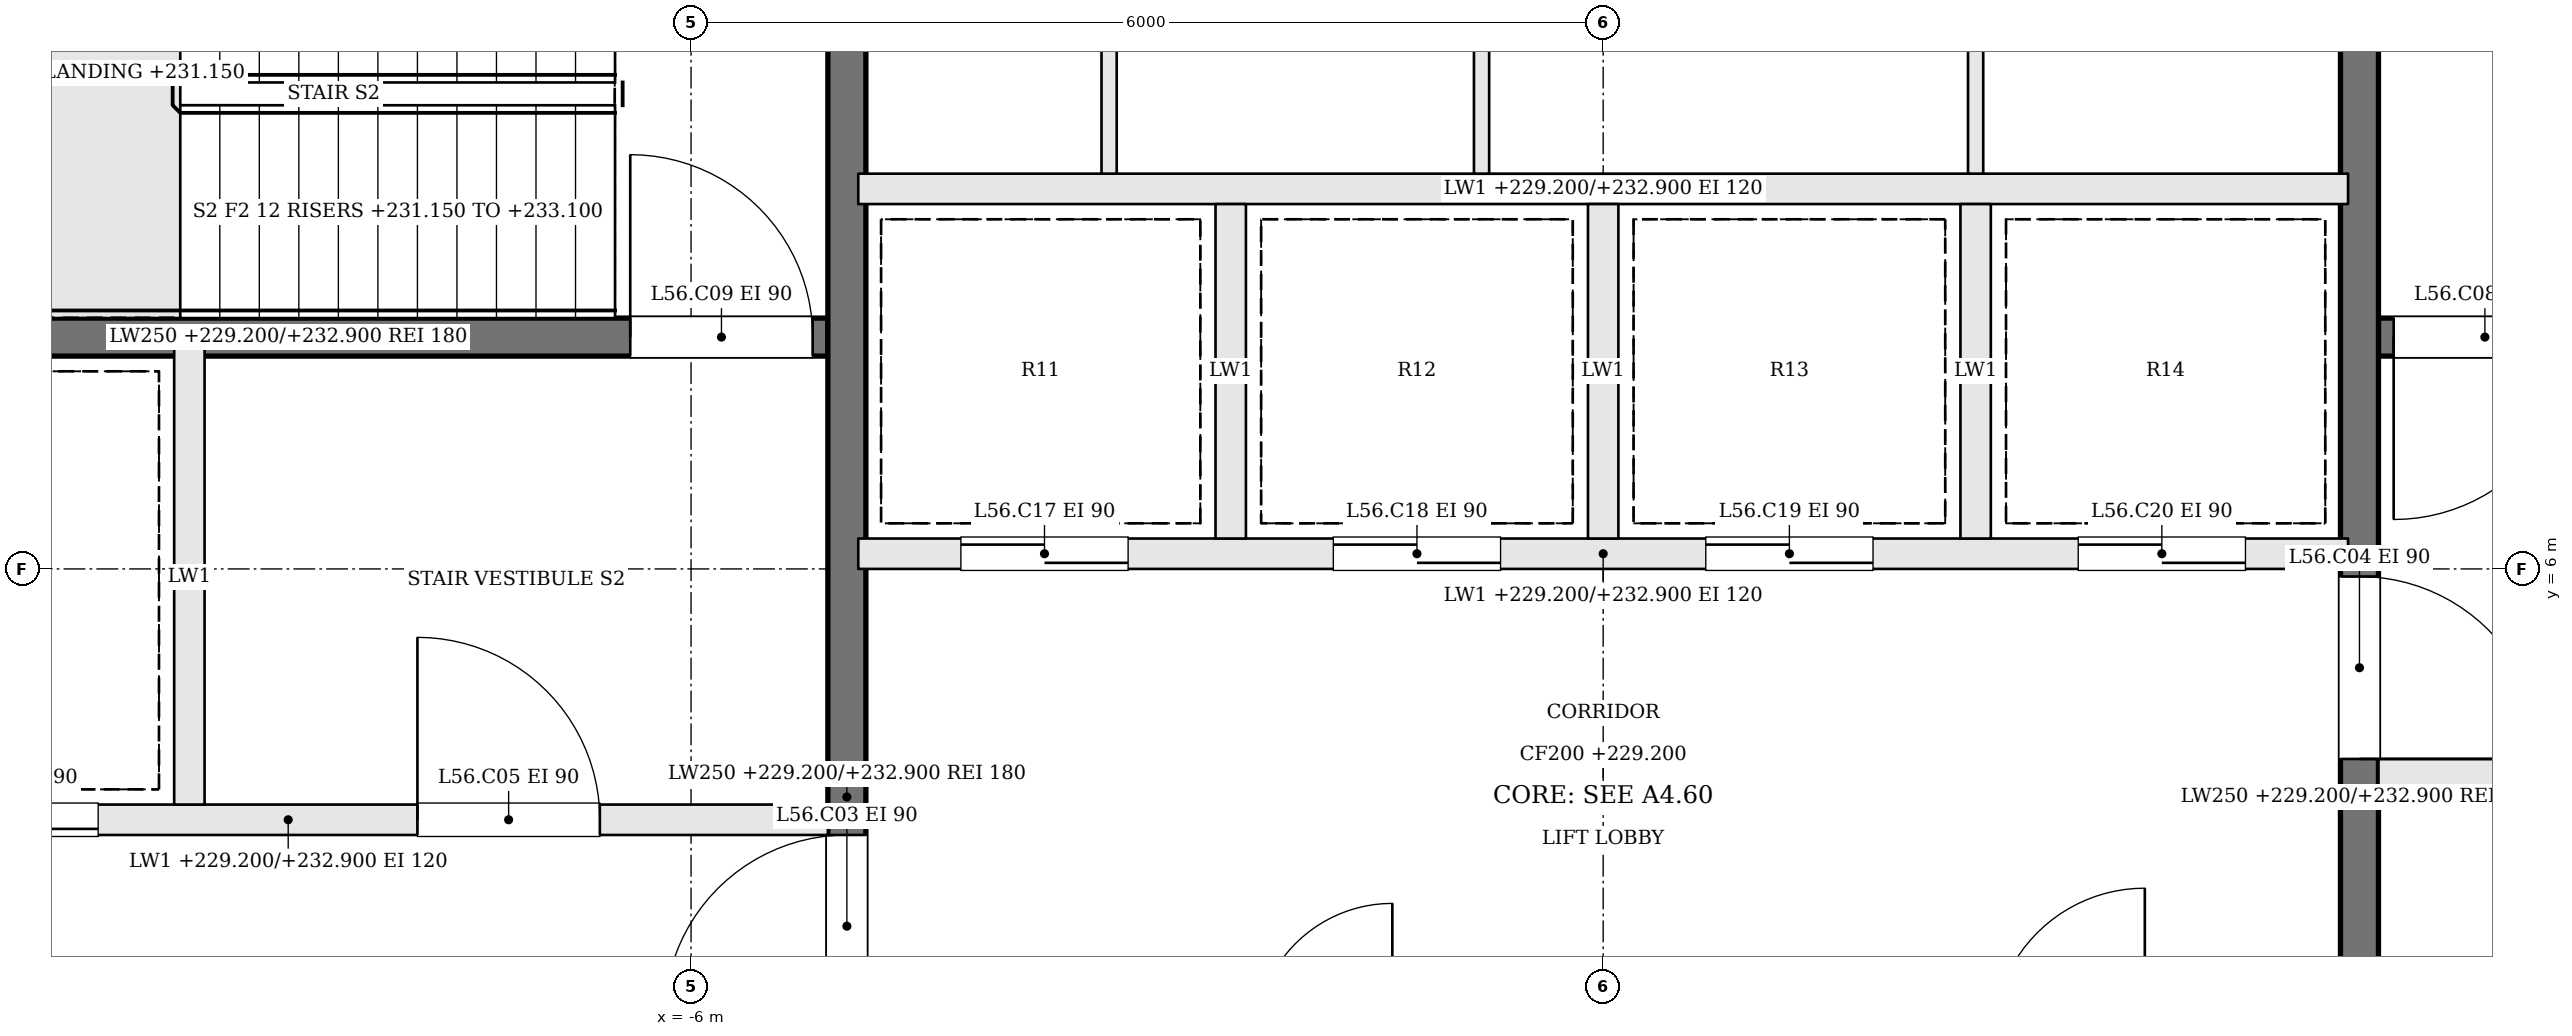
"""IFC4 building model, lengths in metres.
Left out: names, types, materials, properties, quantities, classifications, styles, units other than length and angle.
Written with IfcOpenShell. Run it as: python <this file> out.ifc"""

import sys

from ifc_helpers import new_model, si_unit, direction, frame, frame_2d, origin, place, context, subcontext, project, spatial, rectangle, extrude, element, fill, save


model = new_model("IFC4")
c1 = context("Model", 3, precision=1e-05, world=origin(), true_north=direction((0.0, 1.0)))
c2 = subcontext(c1, "Body", "Model", "MODEL_VIEW")
j1 = project(units=[si_unit("LENGTHUNIT", "METRE"), si_unit("PLANEANGLEUNIT", "RADIAN")], contexts=[c1])
p1 = place(None, origin())
s1 = spatial("IfcSite", under=j1, at=p1, CompositionType="ELEMENT")
p2 = place(p1, origin())
s2 = spatial("IfcBuilding", under=s1, at=p2, CompositionType="ELEMENT")
p3 = place(p2, frame((0.0, 0.0, 229.2)))
s3 = spatial("IfcBuildingStorey", under=s2, at=p3, CompositionType="ELEMENT", Elevation=229.2)
p4 = place(p3, frame((12.2, 7.525, 0.0), z_axis=(0.0, 0.0, 1.0), x_axis=(-1.0, 0.0, 0.0)))
e1 = element("IfcWall", 1, at=p4, inside=s3, PredefinedType="SOLIDWALL", context=c2, shape_type="SweptSolid", body=[
    extrude(rectangle(XDim=7.1, YDim=0.25, at=frame_2d((3.55, 0.0))), origin(), (0.0, 0.0, 1.0), 3.7),
])
p5 = place(p4, frame((5.8, 0.0, 0.0)))
e2 = element("IfcOpeningElement", 2, at=p5, cuts=e1, PredefinedType="OPENING", context=c2, shape_type="SweptSolid", body=[
    extrude(rectangle(XDim=1.2, YDim=2.1, at=frame_2d((0.6, 1.05))), frame((0.0, 0.135, 0.0), z_axis=(0.0, -1.0, 0.0), x_axis=(1.0, 0.0, 0.0)), (0.0, 0.0, 1.0), 0.27),
])
p6 = place(p3, frame((-12.2, 4.35, 0.0), z_axis=(0.0, 0.0, 1.0), x_axis=(1.0, 0.0, 0.0)))
e3 = element("IfcWall", 3, at=p6, inside=s3, PredefinedType="SOLIDWALL", context=c2, shape_type="SweptSolid", body=[
    extrude(rectangle(XDim=7.1, YDim=0.2, at=frame_2d((3.55, 0.0))), origin(), (0.0, 0.0, 1.0), 3.7),
])
p7 = place(p6, frame((4.4, 0.0, 0.0)))
e4 = element("IfcOpeningElement", 4, at=p7, cuts=e3, PredefinedType="OPENING", context=c2, shape_type="SweptSolid", body=[
    extrude(rectangle(XDim=1.2, YDim=2.1, at=frame_2d((0.6, 1.05))), frame((0.0, 0.11, 0.0), z_axis=(0.0, -1.0, 0.0), x_axis=(1.0, 0.0, 0.0)), (0.0, 0.0, 1.0), 0.22),
])
p8 = place(p6, frame((1.1, 0.0, 0.0)))
e5 = element("IfcOpeningElement", 5, at=p8, cuts=e3, PredefinedType="OPENING", context=c2, shape_type="SweptSolid", body=[
    extrude(rectangle(XDim=1.2, YDim=2.1, at=frame_2d((0.6, 1.05))), frame((0.0, 0.11, 0.0), z_axis=(0.0, -1.0, 0.0), x_axis=(1.0, 0.0, 0.0)), (0.0, 0.0, 1.0), 0.22),
])
p9 = place(p3, frame((12.2, 4.65, 0.0), z_axis=(0.0, 0.0, 1.0), x_axis=(-1.0, 0.0, 0.0)))
e6 = element("IfcWall", 6, at=p9, inside=s3, PredefinedType="SOLIDWALL", context=c2, shape_type="SweptSolid", body=[
    extrude(rectangle(XDim=7.1, YDim=0.2, at=frame_2d((3.55, 0.0))), origin(), (0.0, 0.0, 1.0), 3.7),
])
p10 = place(p9, frame((4.4, 0.0, 0.0)))
e7 = element("IfcOpeningElement", 7, at=p10, cuts=e6, PredefinedType="OPENING", context=c2, shape_type="SweptSolid", body=[
    extrude(rectangle(XDim=1.2, YDim=2.1, at=frame_2d((0.6, 1.05))), frame((0.0, 0.11, 0.0), z_axis=(0.0, -1.0, 0.0), x_axis=(1.0, 0.0, 0.0)), (0.0, 0.0, 1.0), 0.22),
])
p11 = place(p9, frame((1.1, 0.0, 0.0)))
e8 = element("IfcOpeningElement", 8, at=p11, cuts=e6, PredefinedType="OPENING", context=c2, shape_type="SweptSolid", body=[
    extrude(rectangle(XDim=1.2, YDim=2.1, at=frame_2d((0.6, 1.05))), frame((0.0, 0.11, 0.0), z_axis=(0.0, -1.0, 0.0), x_axis=(1.0, 0.0, 0.0)), (0.0, 0.0, 1.0), 0.22),
])
p12 = place(p3, frame((-12.2, 7.525, 0.0), z_axis=(0.0, 0.0, 1.0), x_axis=(1.0, 0.0, 0.0)))
e9 = element("IfcWall", 9, at=p12, inside=s3, PredefinedType="SOLIDWALL", context=c2, shape_type="SweptSolid", body=[
    extrude(rectangle(XDim=7.1, YDim=0.25, at=frame_2d((3.55, 0.0))), origin(), (0.0, 0.0, 1.0), 3.7),
])
p13 = place(p12, frame((5.8, 0.0, 0.0)))
e10 = element("IfcOpeningElement", 10, at=p13, cuts=e9, PredefinedType="OPENING", context=c2, shape_type="SweptSolid", body=[
    extrude(rectangle(XDim=1.2, YDim=2.1, at=frame_2d((0.6, 1.05))), frame((0.0, 0.135, 0.0), z_axis=(0.0, -1.0, 0.0), x_axis=(1.0, 0.0, 0.0)), (0.0, 0.0, 1.0), 0.27),
])
p14 = place(p3, frame((-9.3, 4.45, 0.0), z_axis=(0.0, 0.0, 1.0), x_axis=(0.0, 1.0, 0.0)))
e11 = element("IfcWall", 11, at=p14, inside=s3, PredefinedType="SOLIDWALL", context=c2, shape_type="SweptSolid", body=[
    extrude(rectangle(XDim=3.0, YDim=0.2, at=frame_2d((1.5, 0.0))), origin(), (0.0, 0.0, 1.0), 3.7),
])
p15 = place(p3, frame((-4.975, -2.2, 0.0), z_axis=(0.0, 0.0, 1.0), x_axis=(0.0, 1.0, 0.0)))
e12 = element("IfcWall", 12, at=p15, inside=s3, PredefinedType="SOLIDWALL", context=c2, shape_type="SweptSolid", body=[
    extrude(rectangle(XDim=13.4, YDim=0.25, at=frame_2d((6.7, 0.0))), origin(), (0.0, 0.0, 1.0), 3.7),
])
p16 = place(p15, frame((5.25, 0.0, 0.0)))
e13 = element("IfcOpeningElement", 13, at=p16, cuts=e12, PredefinedType="OPENING", context=c2, shape_type="SweptSolid", body=[
    extrude(rectangle(XDim=1.2, YDim=2.1, at=frame_2d((0.6, 1.05))), frame((0.0, 0.135, 0.0), z_axis=(0.0, -1.0, 0.0), x_axis=(1.0, 0.0, 0.0)), (0.0, 0.0, 1.0), 0.27),
])
p17 = place(p3, frame((4.975, 11.2, 0.0), z_axis=(0.0, 0.0, 1.0), x_axis=(0.0, -1.0, 0.0)))
e14 = element("IfcWall", 14, at=p17, inside=s3, PredefinedType="SOLIDWALL", context=c2, shape_type="SweptSolid", body=[
    extrude(rectangle(XDim=13.4, YDim=0.25, at=frame_2d((6.7, 0.0))), origin(), (0.0, 0.0, 1.0), 3.7),
])
p18 = place(p17, frame((5.25, 0.0, 0.0)))
e15 = element("IfcOpeningElement", 15, at=p18, cuts=e14, PredefinedType="OPENING", context=c2, shape_type="SweptSolid", body=[
    extrude(rectangle(XDim=1.2, YDim=2.1, at=frame_2d((0.6, 1.05))), frame((0.0, 0.135, 0.0), z_axis=(0.0, -1.0, 0.0), x_axis=(1.0, 0.0, 0.0)), (0.0, 0.0, 1.0), 0.27),
])
p19 = place(p3, frame((-4.9, 6.1, 0.0), z_axis=(0.0, 0.0, 1.0), x_axis=(1.0, 0.0, 0.0)))
e16 = element("IfcWall", 16, at=p19, inside=s3, PredefinedType="SOLIDWALL", context=c2, shape_type="SweptSolid", body=[
    extrude(rectangle(XDim=9.8, YDim=0.2, at=frame_2d((4.9, 0.0))), origin(), (0.0, 0.0, 1.0), 3.7),
])
p20 = place(p19, frame((0.675, 0.0, 0.0)))
e17 = element("IfcOpeningElement", 17, at=p20, cuts=e16, PredefinedType="OPENING", context=c2, shape_type="SweptSolid", body=[
    extrude(rectangle(XDim=1.1, YDim=2.1, at=frame_2d((0.55, 1.05))), frame((0.0, 0.11, 0.0), z_axis=(0.0, -1.0, 0.0), x_axis=(1.0, 0.0, 0.0)), (0.0, 0.0, 1.0), 0.22),
])
p21 = place(p19, frame((3.125, 0.0, 0.0)))
e18 = element("IfcOpeningElement", 18, at=p21, cuts=e16, PredefinedType="OPENING", context=c2, shape_type="SweptSolid", body=[
    extrude(rectangle(XDim=1.1, YDim=2.1, at=frame_2d((0.55, 1.05))), frame((0.0, 0.11, 0.0), z_axis=(0.0, -1.0, 0.0), x_axis=(1.0, 0.0, 0.0)), (0.0, 0.0, 1.0), 0.22),
])
p22 = place(p19, frame((5.575, 0.0, 0.0)))
e19 = element("IfcOpeningElement", 19, at=p22, cuts=e16, PredefinedType="OPENING", context=c2, shape_type="SweptSolid", body=[
    extrude(rectangle(XDim=1.1, YDim=2.1, at=frame_2d((0.55, 1.05))), frame((0.0, 0.11, 0.0), z_axis=(0.0, -1.0, 0.0), x_axis=(1.0, 0.0, 0.0)), (0.0, 0.0, 1.0), 0.22),
])
p23 = place(p19, frame((8.025, 0.0, 0.0)))
e20 = element("IfcOpeningElement", 20, at=p23, cuts=e16, PredefinedType="OPENING", context=c2, shape_type="SweptSolid", body=[
    extrude(rectangle(XDim=1.1, YDim=2.1, at=frame_2d((0.55, 1.05))), frame((0.0, 0.11, 0.0), z_axis=(0.0, -1.0, 0.0), x_axis=(1.0, 0.0, 0.0)), (0.0, 0.0, 1.0), 0.22),
])
p24 = place(p3, frame((-4.9, 8.5, 0.0), z_axis=(0.0, 0.0, 1.0), x_axis=(1.0, 0.0, 0.0)))
e21 = element("IfcWall", 21, at=p24, inside=s3, PredefinedType="SOLIDWALL", context=c2, shape_type="SweptSolid", body=[
    extrude(rectangle(XDim=9.8, YDim=0.2, at=frame_2d((4.9, 0.0))), origin(), (0.0, 0.0, 1.0), 3.7),
])
for number, where, z_axis, x_axis in (
    (22, (-2.45, 6.2, 0.0), (0.0, 0.0, 1.0), (0.0, 1.0, 0.0)),
    (23, (0.0, 6.2, 0.0), (0.0, 0.0, 1.0), (0.0, 1.0, 0.0)),
    (24, (2.45, 6.2, 0.0), (0.0, 0.0, 1.0), (0.0, 1.0, 0.0)),
):
    element("IfcWall", number, at=place(p3, frame(where, z_axis=z_axis, x_axis=x_axis)), inside=s3, PredefinedType="SOLIDWALL", context=c2, shape_type="SweptSolid", body=[
        extrude(rectangle(XDim=2.2, YDim=0.2, at=frame_2d((1.1, 0.0))), origin(), (0.0, 0.0, 1.0), 3.7),
    ])
for number, where, z_axis, x_axis in (
    (25, (-3.25, 8.6, 0.0), (0.0, 0.0, 1.0), (0.0, 1.0, 0.0)),
    (26, (-0.8, 8.6, 0.0), (0.0, 0.0, 1.0), (0.0, 1.0, 0.0)),
    (27, (2.45, 8.6, 0.0), (0.0, 0.0, 1.0), (0.0, 1.0, 0.0)),
):
    element("IfcWall", number, at=place(p3, frame(where, z_axis=z_axis, x_axis=x_axis)), inside=s3, PredefinedType="PARTITIONING", context=c2, shape_type="SweptSolid", body=[
        extrude(rectangle(XDim=2.6, YDim=0.1, at=frame_2d((1.3, 0.0))), origin(), (0.0, 0.0, 1.0), 3.7),
    ])
p25 = place(p16, origin())
e28 = element("IfcDoor", 28, at=p25, inside=s3, OperationType="SINGLE_SWING_LEFT", PredefinedType="DOOR", context=c2, shape_type="SweptSolid", body=[
    extrude(rectangle(XDim=1.2, YDim=2.1, at=frame_2d((0.6, 1.05))), frame((0.0, 0.025, 0.0), z_axis=(0.0, -1.0, 0.0), x_axis=(1.0, 0.0, 0.0)), (0.0, 0.0, 1.0), 0.05),
])
fill(e13, e28)
p26 = place(p18, origin())
e29 = element("IfcDoor", 29, at=p26, inside=s3, OperationType="SINGLE_SWING_RIGHT", PredefinedType="DOOR", context=c2, shape_type="SweptSolid", body=[
    extrude(rectangle(XDim=1.2, YDim=2.1, at=frame_2d((0.6, 1.05))), frame((0.0, 0.025, 0.0), z_axis=(0.0, -1.0, 0.0), x_axis=(1.0, 0.0, 0.0)), (0.0, 0.0, 1.0), 0.05),
])
fill(e15, e29)
p27 = place(p7, origin())
e30 = element("IfcDoor", 30, at=p27, inside=s3, OperationType="SINGLE_SWING_LEFT", PredefinedType="DOOR", context=c2, shape_type="SweptSolid", body=[
    extrude(rectangle(XDim=1.2, YDim=2.1, at=frame_2d((0.6, 1.05))), frame((0.0, 0.025, 0.0), z_axis=(0.0, -1.0, 0.0), x_axis=(1.0, 0.0, 0.0)), (0.0, 0.0, 1.0), 0.05),
])
fill(e4, e30)
p28 = place(p5, origin())
e31 = element("IfcDoor", 31, at=p28, inside=s3, OperationType="SINGLE_SWING_RIGHT", PredefinedType="DOOR", context=c2, shape_type="SweptSolid", body=[
    extrude(rectangle(XDim=1.2, YDim=2.1, at=frame_2d((0.6, 1.05))), frame((0.0, 0.025, 0.0), z_axis=(0.0, -1.0, 0.0), x_axis=(1.0, 0.0, 0.0)), (0.0, 0.0, 1.0), 0.05),
])
fill(e2, e31)
p29 = place(p13, origin())
e32 = element("IfcDoor", 32, at=p29, inside=s3, OperationType="SINGLE_SWING_LEFT", PredefinedType="DOOR", context=c2, shape_type="SweptSolid", body=[
    extrude(rectangle(XDim=1.2, YDim=2.1, at=frame_2d((0.6, 1.05))), frame((0.0, 0.025, 0.0), z_axis=(0.0, -1.0, 0.0), x_axis=(1.0, 0.0, 0.0)), (0.0, 0.0, 1.0), 0.05),
])
fill(e10, e32)
p30 = place(p8, origin())
e33 = element("IfcDoor", 33, at=p30, inside=s3, OperationType="SLIDING_TO_RIGHT", PredefinedType="DOOR", context=c2, shape_type="SweptSolid", body=[
    extrude(rectangle(XDim=1.2, YDim=2.1, at=frame_2d((0.6, 1.05))), frame((0.0, 0.025, 0.0), z_axis=(0.0, -1.0, 0.0), x_axis=(1.0, 0.0, 0.0)), (0.0, 0.0, 1.0), 0.05),
])
fill(e5, e33)
p31 = place(p20, origin())
e34 = element("IfcDoor", 34, at=p31, inside=s3, OperationType="SLIDING_TO_RIGHT", PredefinedType="DOOR", context=c2, shape_type="SweptSolid", body=[
    extrude(rectangle(XDim=1.1, YDim=2.1, at=frame_2d((0.55, 1.05))), frame((0.0, 0.025, 0.0), z_axis=(0.0, -1.0, 0.0), x_axis=(1.0, 0.0, 0.0)), (0.0, 0.0, 1.0), 0.05),
])
fill(e17, e34)
p32 = place(p21, origin())
e35 = element("IfcDoor", 35, at=p32, inside=s3, OperationType="SLIDING_TO_LEFT", PredefinedType="DOOR", context=c2, shape_type="SweptSolid", body=[
    extrude(rectangle(XDim=1.1, YDim=2.1, at=frame_2d((0.55, 1.05))), frame((0.0, 0.025, 0.0), z_axis=(0.0, -1.0, 0.0), x_axis=(1.0, 0.0, 0.0)), (0.0, 0.0, 1.0), 0.05),
])
fill(e18, e35)
p33 = place(p22, origin())
e36 = element("IfcDoor", 36, at=p33, inside=s3, OperationType="SLIDING_TO_RIGHT", PredefinedType="DOOR", context=c2, shape_type="SweptSolid", body=[
    extrude(rectangle(XDim=1.1, YDim=2.1, at=frame_2d((0.55, 1.05))), frame((0.0, 0.025, 0.0), z_axis=(0.0, -1.0, 0.0), x_axis=(1.0, 0.0, 0.0)), (0.0, 0.0, 1.0), 0.05),
])
fill(e19, e36)
p34 = place(p23, origin())
e37 = element("IfcDoor", 37, at=p34, inside=s3, OperationType="SLIDING_TO_LEFT", PredefinedType="DOOR", context=c2, shape_type="SweptSolid", body=[
    extrude(rectangle(XDim=1.1, YDim=2.1, at=frame_2d((0.55, 1.05))), frame((0.0, 0.025, 0.0), z_axis=(0.0, -1.0, 0.0), x_axis=(1.0, 0.0, 0.0)), (0.0, 0.0, 1.0), 0.05),
])
fill(e20, e37)
save(model, sys.argv[1])
